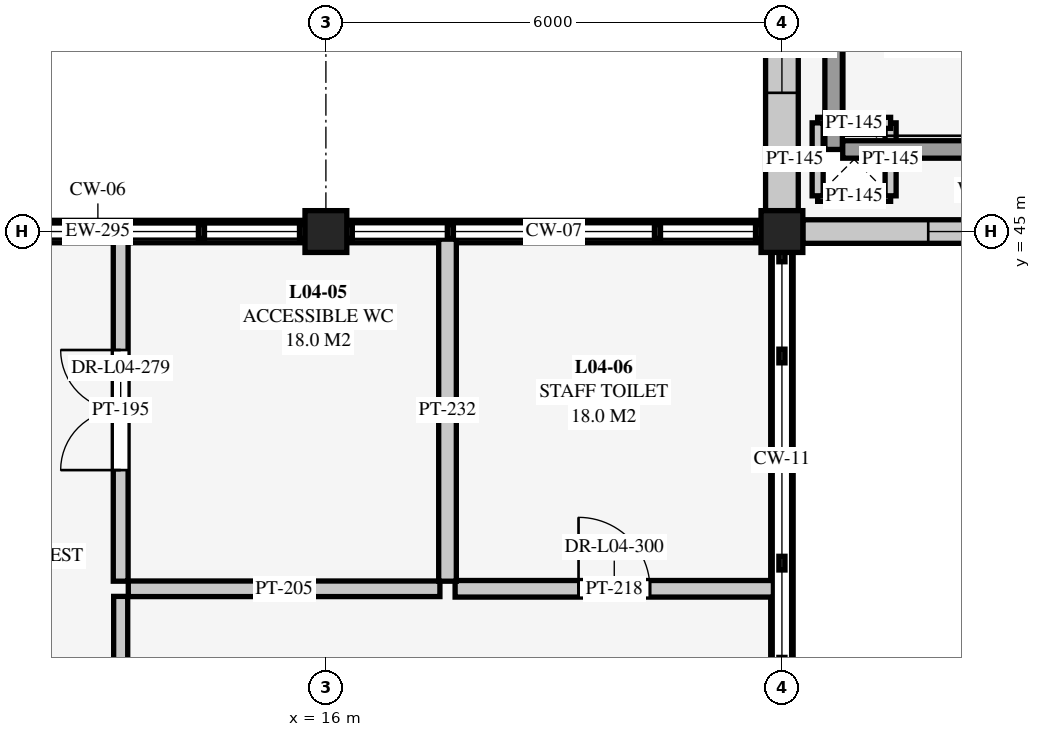
"""IFC4 building model, lengths in metres.
Left out: names, types, materials, properties, quantities, classifications, styles, units other than length and angle.
Written with IfcOpenShell. Run it as: python <this file> out.ifc"""

import sys

from ifc_helpers import new_model, si_unit, direction, frame, frame_2d, origin, origin_2d, place, context, subcontext, project, spatial, rectangle, extrude, element, fill, save


model = new_model("IFC4")
c1 = context("Model", 3, precision=1e-05, world=origin(), true_north=direction((0.0, 1.0)))
c2 = subcontext(c1, "Body", "Model", "MODEL_VIEW")
j1 = project(units=[si_unit("LENGTHUNIT", "METRE"), si_unit("PLANEANGLEUNIT", "RADIAN")], contexts=[c1])
p1 = place(None, origin())
s1 = spatial("IfcSite", under=j1, at=p1, CompositionType="ELEMENT")
p2 = place(p1, origin())
s2 = spatial("IfcBuilding", under=s1, at=p2, CompositionType="ELEMENT")
p3 = place(p2, frame((0.0, 0.0, 13.5)))
s3 = spatial("IfcBuildingStorey", under=s2, at=p3, CompositionType="ELEMENT", Elevation=13.5)
for number, where, z_axis, x_axis in (
    (1, (16.0, 45.0, 0.0), (0.0, 0.0, 1.0), (1.0, 0.0, 0.0)),
    (2, (22.0, 45.0, 0.0), (0.0, 0.0, 1.0), (1.0, 0.0, 0.0)),
):
    element("IfcColumn", number, at=place(p3, frame(where, z_axis=z_axis, x_axis=x_axis)), inside=s3, PredefinedType="COLUMN", context=c2, shape_type="SweptSolid", body=[
        extrude(rectangle(XDim=0.55, YDim=0.55, at=origin_2d()), origin(), (0.0, 0.0, 1.0), 4.5),
    ])
p4 = place(p3, frame((10.275, 45.0, 0.0), z_axis=(0.0, 0.0, 1.0), x_axis=(1.0, 0.0, 0.0)))
e3 = element("IfcWall", 3, at=p4, inside=s3, PredefinedType="SOLIDWALL", context=c2, shape_type="SweptSolid", body=[
    extrude(rectangle(XDim=5.45, YDim=0.295, at=frame_2d((2.725, 0.0))), origin(), (0.0, 0.0, 1.0), 0.41),
])
p5 = place(p3, frame((16.275, 45.0, 0.0), z_axis=(0.0, 0.0, 1.0), x_axis=(1.0, 0.0, 0.0)))
e4 = element("IfcWall", 4, at=p5, inside=s3, PredefinedType="SOLIDWALL", context=c2, shape_type="SweptSolid", body=[
    extrude(rectangle(XDim=5.45, YDim=0.295, at=frame_2d((2.725, 0.0))), origin(), (0.0, 0.0, 1.0), 0.46),
])
p6 = place(p3, frame((22.0, 44.725, 0.0), z_axis=(0.0, 0.0, 1.0), x_axis=(0.0, -1.0, 0.0)))
e5 = element("IfcWall", 5, at=p6, inside=s3, PredefinedType="SOLIDWALL", context=c2, shape_type="SweptSolid", body=[
    extrude(rectangle(XDim=5.45, YDim=0.295, at=frame_2d((2.725, 0.0))), origin(), (0.0, 0.0, 1.0), 0.26),
])
p7 = place(p3, frame((27.725, 45.0, 0.0), z_axis=(0.0, 0.0, 1.0), x_axis=(-1.0, 0.0, 0.0)))
e6 = element("IfcWall", 6, at=p7, inside=s3, PredefinedType="SOLIDWALL", context=c2, shape_type="SweptSolid", body=[
    extrude(rectangle(XDim=5.45, YDim=0.31, at=frame_2d((2.725, 0.0))), origin(), (0.0, 0.0, 1.0), 3.881),
])
p8 = place(p7, frame((1.65, 0.0, 0.7)))
e7 = element("IfcOpeningElement", 7, at=p8, cuts=e6, PredefinedType="OPENING", context=c2, shape_type="SweptSolid", body=[
    extrude(rectangle(XDim=2.15, YDim=2.4, at=frame_2d((1.075, 1.2))), frame((0.0, 0.165, 0.0), z_axis=(0.0, -1.0, 0.0), x_axis=(1.0, 0.0, 0.0)), (0.0, 0.0, 1.0), 0.33),
])
p9 = place(p3, frame((22.0, 45.275, 0.0), z_axis=(0.0, 0.0, 1.0), x_axis=(0.0, 1.0, 0.0)))
e8 = element("IfcWall", 8, at=p9, inside=s3, PredefinedType="SOLIDWALL", context=c2, shape_type="SweptSolid", body=[
    extrude(rectangle(XDim=5.45, YDim=0.43, at=frame_2d((2.725, 0.0))), origin(), (0.0, 0.0, 1.0), 3.881),
])
p10 = place(p9, frame((1.55, 0.0, 0.65)))
e9 = element("IfcOpeningElement", 9, at=p10, cuts=e8, PredefinedType="OPENING", context=c2, shape_type="SweptSolid", body=[
    extrude(rectangle(XDim=2.35, YDim=2.45, at=frame_2d((1.175, 1.225))), frame((0.0, 0.225, 0.0), z_axis=(0.0, -1.0, 0.0), x_axis=(1.0, 0.0, 0.0)), (0.0, 0.0, 1.0), 0.45),
])
for number, where, z_axis, x_axis in (
    (10, (22.47, 45.47, 0.0), (0.0, 0.0, 1.0), (1.0, 0.0, 0.0)),
    (11, (23.43, 45.47, 0.0), (0.0, 0.0, 1.0), (0.0, 1.0, 0.0)),
    (12, (23.43, 46.43, 0.0), (0.0, 0.0, 1.0), (-1.0, 0.0, 0.0)),
    (13, (22.47, 46.43, 0.0), (0.0, 0.0, 1.0), (0.0, -1.0, 0.0)),
):
    element("IfcWall", number, at=place(p3, frame(where, z_axis=z_axis, x_axis=x_axis)), inside=s3, PredefinedType="PARTITIONING", context=c2, shape_type="SweptSolid", body=[
        extrude(rectangle(XDim=0.96, YDim=0.145, at=frame_2d((0.48, 0.0))), origin(), (0.0, 0.0, 1.0), 4.288),
    ])
p11 = place(p3, frame((22.68, 46.08, 0.0), z_axis=(0.0, 0.0, 1.0), x_axis=(0.0, 1.0, 0.0)))
e14 = element("IfcWall", 14, at=p11, inside=s3, PredefinedType="SHEAR", context=c2, shape_type="SweptSolid", body=[
    extrude(rectangle(XDim=3.84, YDim=0.23, at=frame_2d((1.92, 0.0))), origin(), (0.0, 0.0, 1.0), 4.288),
])
p12 = place(p3, frame((22.8, 46.08, 0.0), z_axis=(0.0, 0.0, 1.0), x_axis=(1.0, 0.0, 0.0)))
e15 = element("IfcWall", 15, at=p12, inside=s3, PredefinedType="SHEAR", context=c2, shape_type="SweptSolid", body=[
    extrude(rectangle(XDim=5.24, YDim=0.23, at=frame_2d((2.62, 0.0))), origin(), (0.0, 0.0, 1.0), 4.288),
])
p13 = place(p3, frame((13.3, 33.2, 0.0), z_axis=(0.0, 0.0, 1.0), x_axis=(0.0, 1.0, 0.0)))
e16 = element("IfcWall", 16, at=p13, inside=s3, PredefinedType="PARTITIONING", context=c2, shape_type="SweptSolid", body=[
    extrude(rectangle(XDim=7.0, YDim=0.185, at=frame_2d((3.5, 0.0))), origin(), (0.0, 0.0, 1.0), 4.288),
])
p14 = place(p13, frame((2.46, 0.0, 0.0)))
e17 = element("IfcOpeningElement", 17, at=p14, cuts=e16, PredefinedType="OPENING", context=c2, shape_type="SweptSolid", body=[
    extrude(rectangle(XDim=2.08, YDim=2.36, at=frame_2d((1.04, 1.18))), frame((0.0, 0.103, 0.0), z_axis=(0.0, -1.0, 0.0), x_axis=(1.0, 0.0, 0.0)), (0.0, 0.0, 1.0), 0.205),
])
p15 = place(p3, frame((13.3, 40.4, 0.0), z_axis=(0.0, 0.0, 1.0), x_axis=(0.0, 1.0, 0.0)))
e18 = element("IfcWall", 18, at=p15, inside=s3, PredefinedType="PARTITIONING", context=c2, shape_type="SweptSolid", body=[
    extrude(rectangle(XDim=4.503, YDim=0.195, at=frame_2d((2.251, 0.0))), origin(), (0.0, 0.0, 1.0), 4.288),
])
p16 = place(p15, frame((1.461, 0.0, 0.0)))
e19 = element("IfcOpeningElement", 19, at=p16, cuts=e18, PredefinedType="OPENING", context=c2, shape_type="SweptSolid", body=[
    extrude(rectangle(XDim=1.58, YDim=2.2, at=frame_2d((0.79, 1.1))), frame((0.0, 0.108, 0.0), z_axis=(0.0, -1.0, 0.0), x_axis=(1.0, 0.0, 0.0)), (0.0, 0.0, 1.0), 0.215),
])
p17 = place(p3, frame((13.4, 40.3, 0.0), z_axis=(0.0, 0.0, 1.0), x_axis=(1.0, 0.0, 0.0)))
e20 = element("IfcWall", 20, at=p17, inside=s3, PredefinedType="PARTITIONING", context=c2, shape_type="SweptSolid", body=[
    extrude(rectangle(XDim=4.1, YDim=0.205, at=frame_2d((2.05, 0.0))), origin(), (0.0, 0.0, 1.0), 4.288),
])
p18 = place(p3, frame((17.7, 40.3, 0.0), z_axis=(0.0, 0.0, 1.0), x_axis=(1.0, 0.0, 0.0)))
e21 = element("IfcWall", 21, at=p18, inside=s3, PredefinedType="PARTITIONING", context=c2, shape_type="SweptSolid", body=[
    extrude(rectangle(XDim=4.188, YDim=0.218, at=frame_2d((2.094, 0.0))), origin(), (0.0, 0.0, 1.0), 4.288),
])
p19 = place(p18, frame((1.624, 0.0, 0.0)))
e22 = element("IfcOpeningElement", 22, at=p19, cuts=e21, PredefinedType="OPENING", context=c2, shape_type="SweptSolid", body=[
    extrude(rectangle(XDim=0.94, YDim=2.1, at=frame_2d((0.47, 1.05))), frame((0.0, 0.119, 0.0), z_axis=(0.0, -1.0, 0.0), x_axis=(1.0, 0.0, 0.0)), (0.0, 0.0, 1.0), 0.238),
])
p20 = place(p3, frame((17.6, 40.4, 0.0), z_axis=(0.0, 0.0, 1.0), x_axis=(0.0, 1.0, 0.0)))
e23 = element("IfcWall", 23, at=p20, inside=s3, PredefinedType="PARTITIONING", context=c2, shape_type="SweptSolid", body=[
    extrude(rectangle(XDim=4.5, YDim=0.232, at=frame_2d((2.25, 0.0))), origin(), (0.0, 0.0, 1.0), 4.288),
])
p21 = place(p8, origin())
e24 = element("IfcWindow", 24, at=p21, inside=s3, PartitioningType="SINGLE_PANEL", PredefinedType="WINDOW", context=c2, shape_type="SweptSolid", body=[
    extrude(rectangle(XDim=2.15, YDim=2.4, at=frame_2d((1.075, 1.2))), frame((0.0, 0.03, 0.0), z_axis=(0.0, -1.0, 0.0), x_axis=(1.0, 0.0, 0.0)), (0.0, 0.0, 1.0), 0.06),
])
fill(e7, e24)
p22 = place(p10, origin())
e25 = element("IfcWindow", 25, at=p22, inside=s3, PartitioningType="SINGLE_PANEL", PredefinedType="WINDOW", context=c2, shape_type="SweptSolid", body=[
    extrude(rectangle(XDim=2.35, YDim=2.45, at=frame_2d((1.175, 1.225))), frame((0.0, 0.03, 0.0), z_axis=(0.0, -1.0, 0.0), x_axis=(1.0, 0.0, 0.0)), (0.0, 0.0, 1.0), 0.06),
])
fill(e9, e25)
p23 = place(p16, origin())
e26 = element("IfcDoor", 26, at=p23, inside=s3, OperationType="DOUBLE_DOOR_SINGLE_SWING", PredefinedType="DOOR", context=c2, shape_type="SweptSolid", body=[
    extrude(rectangle(XDim=1.58, YDim=2.2, at=frame_2d((0.79, 1.1))), frame((0.0, 0.025, 0.0), z_axis=(0.0, -1.0, 0.0), x_axis=(1.0, 0.0, 0.0)), (0.0, 0.0, 1.0), 0.05),
])
fill(e19, e26)
p24 = place(p19, origin())
e27 = element("IfcDoor", 27, at=p24, inside=s3, OperationType="SINGLE_SWING_LEFT", PredefinedType="DOOR", context=c2, shape_type="SweptSolid", body=[
    extrude(rectangle(XDim=0.94, YDim=2.1, at=frame_2d((0.47, 1.05))), frame((0.0, 0.025, 0.0), z_axis=(0.0, -1.0, 0.0), x_axis=(1.0, 0.0, 0.0)), (0.0, 0.0, 1.0), 0.05),
])
fill(e22, e27)
save(model, sys.argv[1])
